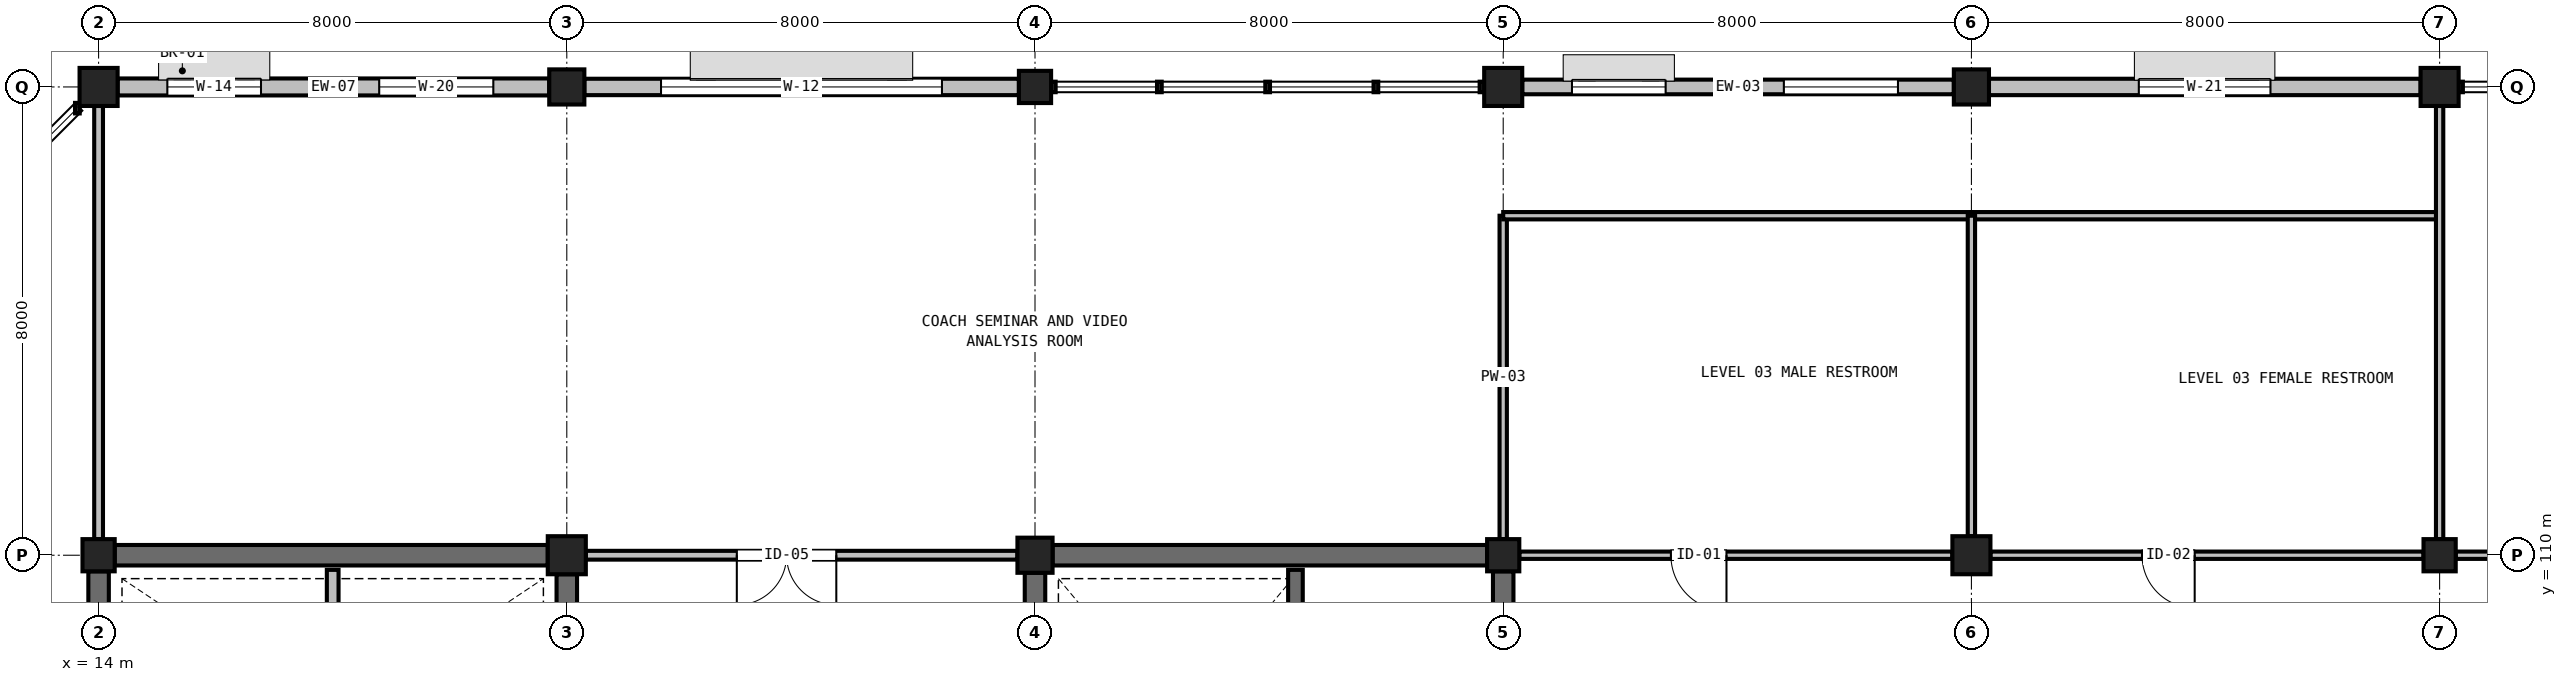
"""IFC4 building model, lengths in metres.
Left out: names, types, materials, properties, quantities, classifications, styles, units other than length and angle.
Written with IfcOpenShell. Run it as: python <this file> out.ifc"""

import sys

from ifc_helpers import new_model, si_unit, direction, frame, frame_2d, origin, origin_2d, place, context, subcontext, project, spatial, rectangle, extrude, element, fill, save


model = new_model("IFC4")
c1 = context("Model", 3, precision=1e-05, world=origin(), true_north=direction((0.0, 1.0)))
c2 = subcontext(c1, "Body", "Model", "MODEL_VIEW")
j1 = project(units=[si_unit("LENGTHUNIT", "METRE"), si_unit("PLANEANGLEUNIT", "RADIAN")], contexts=[c1])
p1 = place(None, origin())
s1 = spatial("IfcSite", under=j1, at=p1, CompositionType="ELEMENT")
p2 = place(p1, origin())
s2 = spatial("IfcBuilding", under=s1, at=p2, CompositionType="ELEMENT")
p3 = place(p2, frame((0.0, 0.0, 15.0)))
s3 = spatial("IfcBuildingStorey", under=s2, at=p3, CompositionType="ELEMENT", Elevation=15.0)
p4 = place(p3, frame((14.0, 110.0, 0.0), z_axis=(0.0, 0.0, 1.0), x_axis=(1.0, 0.0, 0.0)))
e1 = element("IfcColumn", 1, at=p4, inside=s3, PredefinedType="COLUMN", context=c2, shape_type="SweptSolid", body=[
    extrude(rectangle(XDim=0.55, YDim=0.55, at=origin_2d()), origin(), (0.0, 0.0, 1.0), 4.2),
])
for number, where, z_axis, x_axis in (
    (2, (14.0, 118.0, 0.0), (0.0, 0.0, 1.0), (1.0, 0.0, 0.0)),
    (3, (22.0, 110.0, 0.0), (0.0, 0.0, 1.0), (1.0, 0.0, 0.0)),
):
    element("IfcColumn", number, at=place(p3, frame(where, z_axis=z_axis, x_axis=x_axis)), inside=s3, PredefinedType="COLUMN", context=c2, shape_type="SweptSolid", body=[
        extrude(rectangle(XDim=0.65, YDim=0.65, at=origin_2d()), origin(), (0.0, 0.0, 1.0), 4.2),
    ])
for number, where, z_axis, x_axis in (
    (4, (22.0, 118.0, 0.0), (0.0, 0.0, 1.0), (1.0, 0.0, 0.0)),
    (5, (30.0, 110.0, 0.0), (0.0, 0.0, 1.0), (1.0, 0.0, 0.0)),
):
    element("IfcColumn", number, at=place(p3, frame(where, z_axis=z_axis, x_axis=x_axis)), inside=s3, PredefinedType="COLUMN", context=c2, shape_type="SweptSolid", body=[
        extrude(rectangle(XDim=0.6, YDim=0.6, at=origin_2d()), origin(), (0.0, 0.0, 1.0), 4.2),
    ])
for number, where, z_axis, x_axis in (
    (6, (30.0, 118.0, 0.0), (0.0, 0.0, 1.0), (1.0, 0.0, 0.0)),
    (7, (38.0, 110.0, 0.0), (0.0, 0.0, 1.0), (1.0, 0.0, 0.0)),
):
    element("IfcColumn", number, at=place(p3, frame(where, z_axis=z_axis, x_axis=x_axis)), inside=s3, PredefinedType="COLUMN", context=c2, shape_type="SweptSolid", body=[
        extrude(rectangle(XDim=0.55, YDim=0.55, at=origin_2d()), origin(), (0.0, 0.0, 1.0), 4.2),
    ])
for number, where, z_axis, x_axis in (
    (8, (38.0, 118.0, 0.0), (0.0, 0.0, 1.0), (1.0, 0.0, 0.0)),
    (9, (46.0, 110.0, 0.0), (0.0, 0.0, 1.0), (1.0, 0.0, 0.0)),
):
    element("IfcColumn", number, at=place(p3, frame(where, z_axis=z_axis, x_axis=x_axis)), inside=s3, PredefinedType="COLUMN", context=c2, shape_type="SweptSolid", body=[
        extrude(rectangle(XDim=0.65, YDim=0.65, at=origin_2d()), origin(), (0.0, 0.0, 1.0), 4.2),
    ])
p5 = place(p3, frame((46.0, 118.0, 0.0), z_axis=(0.0, 0.0, 1.0), x_axis=(1.0, 0.0, 0.0)))
e10 = element("IfcColumn", 10, at=p5, inside=s3, PredefinedType="COLUMN", context=c2, shape_type="SweptSolid", body=[
    extrude(rectangle(XDim=0.6, YDim=0.6, at=origin_2d()), origin(), (0.0, 0.0, 1.0), 4.2),
])
p6 = place(p3, frame((54.0, 110.0, 0.0), z_axis=(0.0, 0.0, 1.0), x_axis=(1.0, 0.0, 0.0)))
e11 = element("IfcColumn", 11, at=p6, inside=s3, PredefinedType="COLUMN", context=c2, shape_type="SweptSolid", body=[
    extrude(rectangle(XDim=0.55, YDim=0.55, at=origin_2d()), origin(), (0.0, 0.0, 1.0), 4.2),
])
p7 = place(p3, frame((54.0, 118.0, 0.0), z_axis=(0.0, 0.0, 1.0), x_axis=(1.0, 0.0, 0.0)))
e12 = element("IfcColumn", 12, at=p7, inside=s3, PredefinedType="COLUMN", context=c2, shape_type="SweptSolid", body=[
    extrude(rectangle(XDim=0.65, YDim=0.65, at=origin_2d()), origin(), (0.0, 0.0, 1.0), 4.2),
])
p8 = place(p3, frame((14.325, 118.0, 0.0), z_axis=(0.0, 0.0, 1.0), x_axis=(1.0, 0.0, 0.0)))
e13 = element("IfcWall", 13, at=p8, inside=s3, PredefinedType="SOLIDWALL", context=c2, shape_type="SweptSolid", body=[
    extrude(rectangle(XDim=7.375, YDim=0.29, at=frame_2d((3.688, 0.0))), origin(), (0.0, 0.0, 1.0), 3.13),
])
p9 = place(p8, frame((0.85, 0.0, 0.55)))
e14 = element("IfcOpeningElement", 14, at=p9, cuts=e13, PredefinedType="OPENING", context=c2, shape_type="SweptSolid", body=[
    extrude(rectangle(XDim=1.6, YDim=2.0, at=frame_2d((0.8, 1.0))), frame((0.0, 0.155, 0.0), z_axis=(0.0, -1.0, 0.0), x_axis=(1.0, 0.0, 0.0)), (0.0, 0.0, 1.0), 0.31),
])
p10 = place(p8, frame((4.47, 0.0, 0.7)))
e15 = element("IfcOpeningElement", 15, at=p10, cuts=e13, PredefinedType="OPENING", context=c2, shape_type="SweptSolid", body=[
    extrude(rectangle(XDim=1.95, YDim=1.85, at=frame_2d((0.975, 0.925))), frame((0.0, 0.155, 0.0), z_axis=(0.0, -1.0, 0.0), x_axis=(1.0, 0.0, 0.0)), (0.0, 0.0, 1.0), 0.31),
])
p11 = place(p3, frame((22.3, 118.0, 0.0), z_axis=(0.0, 0.0, 1.0), x_axis=(1.0, 0.0, 0.0)))
e16 = element("IfcWall", 16, at=p11, inside=s3, PredefinedType="SOLIDWALL", context=c2, shape_type="SweptSolid", body=[
    extrude(rectangle(XDim=7.425, YDim=0.28, at=frame_2d((3.712, 0.0))), origin(), (0.0, 0.0, 1.0), 3.08),
])
p12 = place(p11, frame((1.31, 0.0, 1.15)))
e17 = element("IfcOpeningElement", 17, at=p12, cuts=e16, PredefinedType="OPENING", context=c2, shape_type="SweptSolid", body=[
    extrude(rectangle(XDim=4.8, YDim=1.4, at=frame_2d((2.4, 0.7))), frame((0.0, 0.15, 0.0), z_axis=(0.0, -1.0, 0.0), x_axis=(1.0, 0.0, 0.0)), (0.0, 0.0, 1.0), 0.3),
])
p13 = place(p3, frame((38.325, 118.0, 0.0), z_axis=(0.0, 0.0, 1.0), x_axis=(1.0, 0.0, 0.0)))
e18 = element("IfcWall", 18, at=p13, inside=s3, PredefinedType="SOLIDWALL", context=c2, shape_type="SweptSolid", body=[
    extrude(rectangle(XDim=7.375, YDim=0.25, at=frame_2d((3.688, 0.0))), origin(), (0.0, 0.0, 1.0), 2.88),
])
p14 = place(p13, frame((0.85, 0.0, 0.55)))
e19 = element("IfcOpeningElement", 19, at=p14, cuts=e18, PredefinedType="OPENING", context=c2, shape_type="SweptSolid", body=[
    extrude(rectangle(XDim=1.6, YDim=2.0, at=frame_2d((0.8, 1.0))), frame((0.0, 0.135, 0.0), z_axis=(0.0, -1.0, 0.0), x_axis=(1.0, 0.0, 0.0)), (0.0, 0.0, 1.0), 0.27),
])
p15 = place(p13, frame((4.47, 0.0, 0.7)))
e20 = element("IfcOpeningElement", 20, at=p15, cuts=e18, PredefinedType="OPENING", context=c2, shape_type="SweptSolid", body=[
    extrude(rectangle(XDim=1.95, YDim=1.85, at=frame_2d((0.975, 0.925))), frame((0.0, 0.135, 0.0), z_axis=(0.0, -1.0, 0.0), x_axis=(1.0, 0.0, 0.0)), (0.0, 0.0, 1.0), 0.27),
])
p16 = place(p3, frame((46.3, 118.0, 0.0), z_axis=(0.0, 0.0, 1.0), x_axis=(1.0, 0.0, 0.0)))
e21 = element("IfcWall", 21, at=p16, inside=s3, PredefinedType="SOLIDWALL", context=c2, shape_type="SweptSolid", body=[
    extrude(rectangle(XDim=7.375, YDim=0.28, at=frame_2d((3.688, 0.0))), origin(), (0.0, 0.0, 1.0), 2.63),
])
p17 = place(p16, frame((2.56, 0.0, 0.7)))
e22 = element("IfcOpeningElement", 22, at=p17, cuts=e21, PredefinedType="OPENING", context=c2, shape_type="SweptSolid", body=[
    extrude(rectangle(XDim=2.25, YDim=1.85, at=frame_2d((1.125, 0.925))), frame((0.0, 0.15, 0.0), z_axis=(0.0, -1.0, 0.0), x_axis=(1.0, 0.0, 0.0)), (0.0, 0.0, 1.0), 0.3),
])
p18 = place(p3, frame((14.275, 110.0, 0.0), z_axis=(0.0, 0.0, 1.0), x_axis=(1.0, 0.0, 0.0)))
e23 = element("IfcWall", 23, at=p18, inside=s3, PredefinedType="SHEAR", context=c2, shape_type="SweptSolid", body=[
    extrude(rectangle(XDim=7.4, YDim=0.35, at=frame_2d((3.7, 0.0))), origin(), (0.0, 0.0, 1.0), 3.98),
])
p19 = place(p3, frame((14.0, 102.3, 0.0), z_axis=(0.0, 0.0, 1.0), x_axis=(0.0, 1.0, 0.0)))
e24 = element("IfcWall", 24, at=p19, inside=s3, PredefinedType="SHEAR", context=c2, shape_type="SweptSolid", body=[
    extrude(rectangle(XDim=7.425, YDim=0.35, at=frame_2d((3.712, 0.0))), origin(), (0.0, 0.0, 1.0), 3.98),
])
p20 = place(p3, frame((22.0, 102.275, 0.0), z_axis=(0.0, 0.0, 1.0), x_axis=(0.0, 1.0, 0.0)))
e25 = element("IfcWall", 25, at=p20, inside=s3, PredefinedType="SHEAR", context=c2, shape_type="SweptSolid", body=[
    extrude(rectangle(XDim=7.4, YDim=0.35, at=frame_2d((3.7, 0.0))), origin(), (0.0, 0.0, 1.0), 3.98),
])
p21 = place(p20, frame((0.35, 0.0, 0.0)))
e26 = element("IfcOpeningElement", 26, at=p21, cuts=e25, PredefinedType="OPENING", context=c2, shape_type="SweptSolid", body=[
    extrude(rectangle(XDim=1.8, YDim=2.2, at=frame_2d((0.9, 1.1))), frame((0.0, 0.185, 0.0), z_axis=(0.0, -1.0, 0.0), x_axis=(1.0, 0.0, 0.0)), (0.0, 0.0, 1.0), 0.37),
])
p22 = place(p3, frame((18.0, 105.35, 0.0), z_axis=(0.0, 0.0, 1.0), x_axis=(0.0, 1.0, 0.0)))
e27 = element("IfcWall", 27, at=p22, inside=s3, PredefinedType="PARTITIONING", context=c2, shape_type="SweptSolid", body=[
    extrude(rectangle(XDim=4.4, YDim=0.2, at=frame_2d((2.2, 0.0))), origin(), (0.0, 0.0, 1.0), 3.9),
])
p23 = place(p3, frame((30.3, 110.0, 0.0), z_axis=(0.0, 0.0, 1.0), x_axis=(1.0, 0.0, 0.0)))
e28 = element("IfcWall", 28, at=p23, inside=s3, PredefinedType="SHEAR", context=c2, shape_type="SweptSolid", body=[
    extrude(rectangle(XDim=7.425, YDim=0.35, at=frame_2d((3.712, 0.0))), origin(), (0.0, 0.0, 1.0), 3.98),
])
p24 = place(p3, frame((30.0, 102.325, 0.0), z_axis=(0.0, 0.0, 1.0), x_axis=(0.0, 1.0, 0.0)))
e29 = element("IfcWall", 29, at=p24, inside=s3, PredefinedType="SHEAR", context=c2, shape_type="SweptSolid", body=[
    extrude(rectangle(XDim=7.375, YDim=0.35, at=frame_2d((3.688, 0.0))), origin(), (0.0, 0.0, 1.0), 3.98),
])
p25 = place(p24, frame((0.35, 0.0, 0.0)))
e30 = element("IfcOpeningElement", 30, at=p25, cuts=e29, PredefinedType="OPENING", context=c2, shape_type="SweptSolid", body=[
    extrude(rectangle(XDim=1.8, YDim=2.2, at=frame_2d((0.9, 1.1))), frame((0.0, 0.185, 0.0), z_axis=(0.0, -1.0, 0.0), x_axis=(1.0, 0.0, 0.0)), (0.0, 0.0, 1.0), 0.37),
])
p26 = place(p3, frame((38.0, 102.3, 0.0), z_axis=(0.0, 0.0, 1.0), x_axis=(0.0, 1.0, 0.0)))
e31 = element("IfcWall", 31, at=p26, inside=s3, PredefinedType="SHEAR", context=c2, shape_type="SweptSolid", body=[
    extrude(rectangle(XDim=7.425, YDim=0.35, at=frame_2d((3.712, 0.0))), origin(), (0.0, 0.0, 1.0), 3.98),
])
p27 = place(p3, frame((34.45, 105.2, 0.0), z_axis=(0.0, 0.0, 1.0), x_axis=(0.0, 1.0, 0.0)))
e32 = element("IfcWall", 32, at=p27, inside=s3, PredefinedType="SOLIDWALL", context=c2, shape_type="SweptSolid", body=[
    extrude(rectangle(XDim=4.55, YDim=0.25, at=frame_2d((2.275, 0.0))), origin(), (0.0, 0.0, 1.0), 3.98),
])
p28 = place(p3, frame((14.0, 110.275, 0.0), z_axis=(0.0, 0.0, 1.0), x_axis=(0.0, 1.0, 0.0)))
e33 = element("IfcWall", 33, at=p28, inside=s3, PredefinedType="PARTITIONING", context=c2, shape_type="SweptSolid", body=[
    extrude(rectangle(XDim=7.4, YDim=0.15, at=frame_2d((3.7, 0.0))), origin(), (0.0, 0.0, 1.0), 3.23),
])
p29 = place(p3, frame((38.0, 110.275, 0.0), z_axis=(0.0, 0.0, 1.0), x_axis=(0.0, 1.0, 0.0)))
e34 = element("IfcWall", 34, at=p29, inside=s3, PredefinedType="PARTITIONING", context=c2, shape_type="SweptSolid", body=[
    extrude(rectangle(XDim=5.525, YDim=0.125, at=frame_2d((2.763, 0.0))), origin(), (0.0, 0.0, 1.0), 3.15),
])
p30 = place(p3, frame((22.325, 110.0, 0.0), z_axis=(0.0, 0.0, 1.0), x_axis=(1.0, 0.0, 0.0)))
e35 = element("IfcWall", 35, at=p30, inside=s3, PredefinedType="PARTITIONING", context=c2, shape_type="SweptSolid", body=[
    extrude(rectangle(XDim=7.375, YDim=0.15, at=frame_2d((3.688, 0.0))), origin(), (0.0, 0.0, 1.0), 3.28),
])
p31 = place(p30, frame((2.58, 0.0, 0.0)))
e36 = element("IfcOpeningElement", 36, at=p31, cuts=e35, PredefinedType="OPENING", context=c2, shape_type="SweptSolid", body=[
    extrude(rectangle(XDim=1.7, YDim=2.25, at=frame_2d((0.85, 1.125))), frame((0.0, 0.085, 0.0), z_axis=(0.0, -1.0, 0.0), x_axis=(1.0, 0.0, 0.0)), (0.0, 0.0, 1.0), 0.17),
])
p32 = place(p3, frame((38.275, 110.0, 0.0), z_axis=(0.0, 0.0, 1.0), x_axis=(1.0, 0.0, 0.0)))
e37 = element("IfcWall", 37, at=p32, inside=s3, PredefinedType="PARTITIONING", context=c2, shape_type="SweptSolid", body=[
    extrude(rectangle(XDim=7.4, YDim=0.125, at=frame_2d((3.7, 0.0))), origin(), (0.0, 0.0, 1.0), 3.03),
])
p33 = place(p32, frame((2.59, 0.0, 0.0)))
e38 = element("IfcOpeningElement", 38, at=p33, cuts=e37, PredefinedType="OPENING", context=c2, shape_type="SweptSolid", body=[
    extrude(rectangle(XDim=0.95, YDim=2.1, at=frame_2d((0.475, 1.05))), frame((0.0, 0.073, 0.0), z_axis=(0.0, -1.0, 0.0), x_axis=(1.0, 0.0, 0.0)), (0.0, 0.0, 1.0), 0.145),
])
p34 = place(p3, frame((46.325, 110.0, 0.0), z_axis=(0.0, 0.0, 1.0), x_axis=(1.0, 0.0, 0.0)))
e39 = element("IfcWall", 39, at=p34, inside=s3, PredefinedType="PARTITIONING", context=c2, shape_type="SweptSolid", body=[
    extrude(rectangle(XDim=7.4, YDim=0.125, at=frame_2d((3.7, 0.0))), origin(), (0.0, 0.0, 1.0), 3.43),
])
p35 = place(p34, frame((2.59, 0.0, 0.0)))
e40 = element("IfcOpeningElement", 40, at=p35, cuts=e39, PredefinedType="OPENING", context=c2, shape_type="SweptSolid", body=[
    extrude(rectangle(XDim=0.9, YDim=2.1, at=frame_2d((0.45, 1.05))), frame((0.0, 0.073, 0.0), z_axis=(0.0, -1.0, 0.0), x_axis=(1.0, 0.0, 0.0)), (0.0, 0.0, 1.0), 0.145),
])
p36 = place(p3, frame((54.275, 110.0, 0.0), z_axis=(0.0, 0.0, 1.0), x_axis=(1.0, 0.0, 0.0)))
e41 = element("IfcWall", 41, at=p36, inside=s3, PredefinedType="PARTITIONING", context=c2, shape_type="SweptSolid", body=[
    extrude(rectangle(XDim=11.725, YDim=0.125, at=frame_2d((5.863, 0.0))), origin(), (0.0, 0.0, 1.0), 3.03),
])
p37 = place(p36, frame((4.69, 0.0, 0.0)))
e42 = element("IfcOpeningElement", 42, at=p37, cuts=e41, PredefinedType="OPENING", context=c2, shape_type="SweptSolid", body=[
    extrude(rectangle(XDim=1.4, YDim=2.2, at=frame_2d((0.7, 1.1))), frame((0.0, 0.073, 0.0), z_axis=(0.0, -1.0, 0.0), x_axis=(1.0, 0.0, 0.0)), (0.0, 0.0, 1.0), 0.145),
])
for number, where, z_axis, x_axis in (
    (43, (38.0, 115.8, 0.0), (0.0, 0.0, 1.0), (1.0, 0.0, 0.0)),
    (44, (46.0, 115.8, 0.0), (0.0, 0.0, 1.0), (1.0, 0.0, 0.0)),
):
    element("IfcWall", number, at=place(p3, frame(where, z_axis=z_axis, x_axis=x_axis)), inside=s3, PredefinedType="PARTITIONING", context=c2, shape_type="SweptSolid", body=[
        extrude(rectangle(XDim=8.0, YDim=0.125, at=frame_2d((4.0, 0.0))), origin(), (0.0, 0.0, 1.0), 3.9),
    ])
p38 = place(p3, frame((46.0, 110.325, 0.0), z_axis=(0.0, 0.0, 1.0), x_axis=(0.0, 1.0, 0.0)))
e45 = element("IfcWall", 45, at=p38, inside=s3, PredefinedType="PARTITIONING", context=c2, shape_type="SweptSolid", body=[
    extrude(rectangle(XDim=5.475, YDim=0.125, at=frame_2d((2.738, 0.0))), origin(), (0.0, 0.0, 1.0), 3.03),
])
p39 = place(p3, frame((54.0, 110.275, 0.0), z_axis=(0.0, 0.0, 1.0), x_axis=(0.0, 1.0, 0.0)))
e46 = element("IfcWall", 46, at=p39, inside=s3, PredefinedType="PARTITIONING", context=c2, shape_type="SweptSolid", body=[
    extrude(rectangle(XDim=7.4, YDim=0.125, at=frame_2d((3.7, 0.0))), origin(), (0.0, 0.0, 1.0), 2.93),
])
p40 = place(p9, origin())
e47 = element("IfcWindow", 47, at=p40, inside=s3, PartitioningType="SINGLE_PANEL", PredefinedType="WINDOW", context=c2, shape_type="SweptSolid", body=[
    extrude(rectangle(XDim=1.6, YDim=2.0, at=frame_2d((0.8, 1.0))), frame((0.0, 0.03, 0.0), z_axis=(0.0, -1.0, 0.0), x_axis=(1.0, 0.0, 0.0)), (0.0, 0.0, 1.0), 0.06),
])
fill(e14, e47)
p41 = place(p10, origin())
e48 = element("IfcWindow", 48, at=p41, inside=s3, PartitioningType="SINGLE_PANEL", PredefinedType="WINDOW", context=c2, shape_type="SweptSolid", body=[
    extrude(rectangle(XDim=1.95, YDim=1.85, at=frame_2d((0.975, 0.925))), frame((0.0, 0.03, 0.0), z_axis=(0.0, -1.0, 0.0), x_axis=(1.0, 0.0, 0.0)), (0.0, 0.0, 1.0), 0.06),
])
fill(e15, e48)
p42 = place(p12, origin())
e49 = element("IfcWindow", 49, at=p42, inside=s3, PartitioningType="SINGLE_PANEL", PredefinedType="WINDOW", context=c2, shape_type="SweptSolid", body=[
    extrude(rectangle(XDim=4.8, YDim=1.4, at=frame_2d((2.4, 0.7))), frame((0.0, 0.03, 0.0), z_axis=(0.0, -1.0, 0.0), x_axis=(1.0, 0.0, 0.0)), (0.0, 0.0, 1.0), 0.06),
])
fill(e17, e49)
p43 = place(p14, origin())
e50 = element("IfcWindow", 50, at=p43, inside=s3, PartitioningType="SINGLE_PANEL", PredefinedType="WINDOW", context=c2, shape_type="SweptSolid", body=[
    extrude(rectangle(XDim=1.6, YDim=2.0, at=frame_2d((0.8, 1.0))), frame((0.0, 0.03, 0.0), z_axis=(0.0, -1.0, 0.0), x_axis=(1.0, 0.0, 0.0)), (0.0, 0.0, 1.0), 0.06),
])
fill(e19, e50)
p44 = place(p15, origin())
e51 = element("IfcWindow", 51, at=p44, inside=s3, PartitioningType="SINGLE_PANEL", PredefinedType="WINDOW", context=c2, shape_type="SweptSolid", body=[
    extrude(rectangle(XDim=1.95, YDim=1.85, at=frame_2d((0.975, 0.925))), frame((0.0, 0.03, 0.0), z_axis=(0.0, -1.0, 0.0), x_axis=(1.0, 0.0, 0.0)), (0.0, 0.0, 1.0), 0.06),
])
fill(e20, e51)
p45 = place(p17, origin())
e52 = element("IfcWindow", 52, at=p45, inside=s3, PartitioningType="SINGLE_PANEL", PredefinedType="WINDOW", context=c2, shape_type="SweptSolid", body=[
    extrude(rectangle(XDim=2.25, YDim=1.85, at=frame_2d((1.125, 0.925))), frame((0.0, 0.03, 0.0), z_axis=(0.0, -1.0, 0.0), x_axis=(1.0, 0.0, 0.0)), (0.0, 0.0, 1.0), 0.06),
])
fill(e22, e52)
p46 = place(p31, frame((1.7, 0.0, 0.0), z_axis=(0.0, 0.0, 1.0), x_axis=(-1.0, 0.0, 0.0)))
e53 = element("IfcDoor", 53, at=p46, inside=s3, OperationType="DOUBLE_DOOR_SINGLE_SWING", PredefinedType="DOOR", context=c2, shape_type="SweptSolid", body=[
    extrude(rectangle(XDim=1.7, YDim=2.25, at=frame_2d((0.85, 1.125))), frame((0.0, 0.025, 0.0), z_axis=(0.0, -1.0, 0.0), x_axis=(1.0, 0.0, 0.0)), (0.0, 0.0, 1.0), 0.05),
])
fill(e36, e53)
p47 = place(p33, frame((0.95, 0.0, 0.0), z_axis=(0.0, 0.0, 1.0), x_axis=(-1.0, 0.0, 0.0)))
e54 = element("IfcDoor", 54, at=p47, inside=s3, OperationType="SINGLE_SWING_RIGHT", PredefinedType="DOOR", context=c2, shape_type="SweptSolid", body=[
    extrude(rectangle(XDim=0.95, YDim=2.1, at=frame_2d((0.475, 1.05))), frame((0.0, 0.025, 0.0), z_axis=(0.0, -1.0, 0.0), x_axis=(1.0, 0.0, 0.0)), (0.0, 0.0, 1.0), 0.05),
])
fill(e38, e54)
p48 = place(p35, frame((0.9, 0.0, 0.0), z_axis=(0.0, 0.0, 1.0), x_axis=(-1.0, 0.0, 0.0)))
e55 = element("IfcDoor", 55, at=p48, inside=s3, OperationType="SINGLE_SWING_RIGHT", PredefinedType="DOOR", context=c2, shape_type="SweptSolid", body=[
    extrude(rectangle(XDim=0.9, YDim=2.1, at=frame_2d((0.45, 1.05))), frame((0.0, 0.025, 0.0), z_axis=(0.0, -1.0, 0.0), x_axis=(1.0, 0.0, 0.0)), (0.0, 0.0, 1.0), 0.05),
])
fill(e40, e55)
save(model, sys.argv[1])
